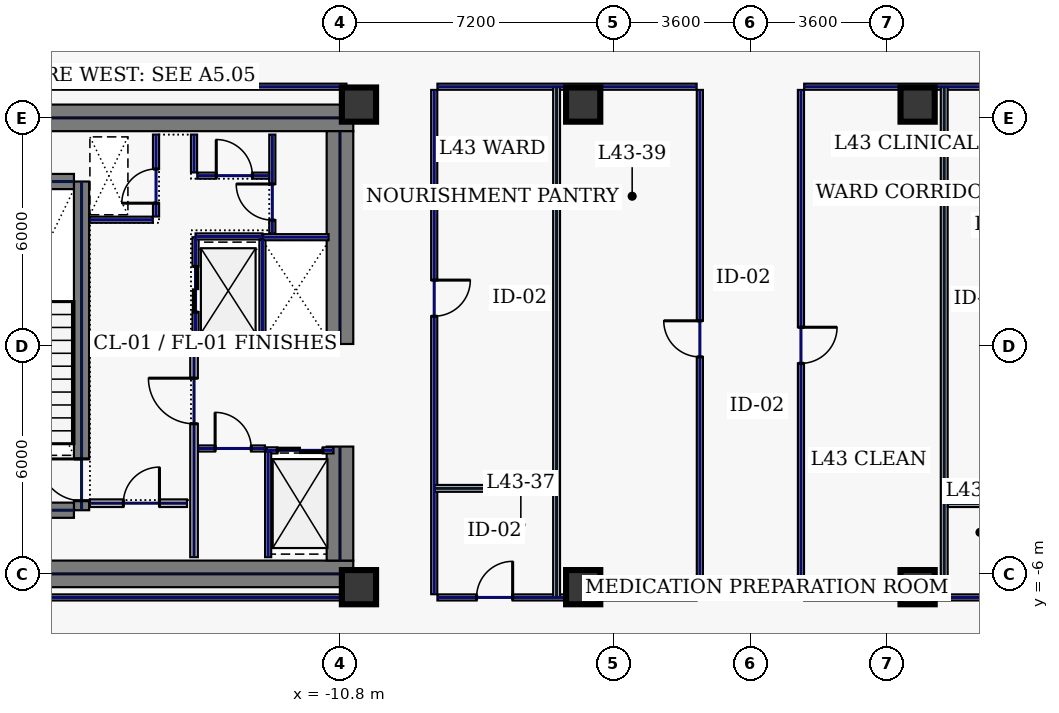
"""IFC4 building model, lengths in metres.
Left out: names, types, materials, properties, quantities, classifications, styles, units other than length and angle.
Written with IfcOpenShell. Run it as: python <this file> out.ifc"""

import sys

from ifc_helpers import new_model, si_unit, direction, frame, frame_2d, origin, origin_2d, place, context, subcontext, project, spatial, rectangle, hollow_rectangle, extrude, element, fill, save


model = new_model("IFC4")
c1 = context("Model", 3, precision=1e-05, world=origin(), true_north=direction((0.0, 1.0)))
c2 = subcontext(c1, "Body", "Model", "MODEL_VIEW")
j1 = project(units=[si_unit("LENGTHUNIT", "METRE"), si_unit("PLANEANGLEUNIT", "RADIAN")], contexts=[c1])
p1 = place(None, origin())
s1 = spatial("IfcSite", under=j1, at=p1, CompositionType="ELEMENT")
p2 = place(p1, origin())
s2 = spatial("IfcBuilding", under=s1, at=p2, CompositionType="ELEMENT")
p3 = place(p2, frame((0.0, 0.0, 188.2)))
s3 = spatial("IfcBuildingStorey", under=s2, at=p3, CompositionType="ELEMENT", Elevation=188.2)
for number, where, z_axis, x_axis in (
    (1, (-22.0, 6.0, 0.0), (0.0, 0.0, 1.0), (1.0, 0.0, 0.0)),
    (2, (-22.0, -6.0, 0.0), (0.0, 0.0, 1.0), (1.0, 0.0, 0.0)),
):
    element("IfcWall", number, at=place(p3, frame(where, z_axis=z_axis, x_axis=x_axis)), inside=s3, PredefinedType="SHEAR", context=c2, shape_type="SweptSolid", body=[
        extrude(rectangle(XDim=11.55, YDim=0.7, at=frame_2d((5.775, 0.0))), origin(), (0.0, 0.0, 1.0), 3.74),
    ])
p4 = place(p3, frame((-10.8, -5.65, 0.0), z_axis=(0.0, 0.0, 1.0), x_axis=(0.0, 1.0, 0.0)))
e3 = element("IfcWall", 3, at=p4, inside=s3, PredefinedType="SHEAR", context=c2, shape_type="SweptSolid", body=[
    extrude(rectangle(XDim=3.0, YDim=0.7, at=frame_2d((1.5, 0.0))), origin(), (0.0, 0.0, 1.0), 3.74),
])
p5 = place(p3, frame((-10.8, 0.05, 0.0), z_axis=(0.0, 0.0, 1.0), x_axis=(0.0, 1.0, 0.0)))
e4 = element("IfcWall", 4, at=p5, inside=s3, PredefinedType="SHEAR", context=c2, shape_type="SweptSolid", body=[
    extrude(rectangle(XDim=5.6, YDim=0.7, at=frame_2d((2.8, 0.0))), origin(), (0.0, 0.0, 1.0), 3.74),
])
p6 = place(p3, frame((-17.6, -4.325, 0.0), z_axis=(0.0, 0.0, 1.0), x_axis=(0.0, 1.0, 0.0)))
e5 = element("IfcWall", 5, at=p6, inside=s3, PredefinedType="SHEAR", context=c2, shape_type="SweptSolid", body=[
    extrude(rectangle(XDim=8.65, YDim=0.4, at=frame_2d((4.325, 0.0))), origin(), (0.0, 0.0, 1.0), 3.74),
])
p7 = place(p6, frame((0.25, 0.0, 0.0)))
e6 = element("IfcOpeningElement", 6, at=p7, cuts=e5, PredefinedType="OPENING", context=c2, shape_type="SweptSolid", body=[
    extrude(rectangle(XDim=1.1, YDim=2.2, at=frame_2d((0.55, 1.1))), frame((0.0, 0.21, 0.0), z_axis=(0.0, -1.0, 0.0), x_axis=(1.0, 0.0, 0.0)), (0.0, 0.0, 1.0), 0.42),
])
for number, where, z_axis, x_axis in (
    (7, (-21.2, -4.325, 0.0), (0.0, 0.0, 1.0), (1.0, 0.0, 0.0)),
    (8, (-21.2, 4.325, 0.0), (0.0, 0.0, 1.0), (1.0, 0.0, 0.0)),
):
    element("IfcWall", number, at=place(p3, frame(where, z_axis=z_axis, x_axis=x_axis)), inside=s3, PredefinedType="SHEAR", context=c2, shape_type="SweptSolid", body=[
        extrude(rectangle(XDim=3.4, YDim=0.4, at=frame_2d((1.7, 0.0))), origin(), (0.0, 0.0, 1.0), 3.74),
    ])
for number, where, z_axis, x_axis in (
    (9, (-10.3, -6.35, 0.0), (0.0, 0.0, 1.0), (1.0, 0.0, 0.0)),
    (10, (-10.3, 6.35, 0.0), (0.0, 0.0, 1.0), (1.0, 0.0, 0.0)),
    (11, (-4.4, -6.35, 0.0), (0.0, 0.0, 1.0), (1.0, 0.0, 0.0)),
    (12, (4.4, -6.35, 0.0), (0.0, 0.0, 1.0), (1.0, 0.0, 0.0)),
    (13, (-4.4, 6.35, 0.0), (0.0, 0.0, 1.0), (1.0, 0.0, 0.0)),
    (14, (4.4, 6.35, 0.0), (0.0, 0.0, 1.0), (1.0, 0.0, 0.0)),
):
    element("IfcColumn", number, at=place(p3, frame(where, z_axis=z_axis, x_axis=x_axis)), inside=s3, PredefinedType="COLUMN", context=c2, shape_type="SweptSolid", body=[
        extrude(hollow_rectangle(XDim=0.9, YDim=0.9, WallThickness=0.04, at=origin_2d()), origin(), (0.0, 0.0, 1.0), 3.74),
    ])
p8 = place(p3, frame((-14.6, 0.12, 0.0), z_axis=(0.0, 0.0, 1.0), x_axis=(0.0, 1.0, 0.0)))
e15 = element("IfcWall", 15, at=p8, inside=s3, PredefinedType="PARTITIONING", context=c2, shape_type="SweptSolid", body=[
    extrude(rectangle(XDim=2.74, YDim=0.16, at=frame_2d((1.37, 0.0))), origin(), (0.0, 0.0, 1.0), 3.74),
])
p9 = place(p8, frame((0.77, 0.0, 0.0)))
e16 = element("IfcOpeningElement", 16, at=p9, cuts=e15, PredefinedType="OPENING", context=c2, shape_type="SweptSolid", body=[
    extrude(rectangle(XDim=1.2, YDim=2.2, at=frame_2d((0.6, 1.1))), frame((0.0, 0.09, 0.0), z_axis=(0.0, -1.0, 0.0), x_axis=(1.0, 0.0, 0.0)), (0.0, 0.0, 1.0), 0.18),
])
for number, where, z_axis, x_axis in (
    (17, (-14.6, 0.1, 0.0), (0.0, 0.0, 1.0), (1.0, 0.0, 0.0)),
    (18, (-14.6, 2.88, 0.0), (0.0, 0.0, 1.0), (1.0, 0.0, 0.0)),
):
    element("IfcWall", number, at=place(p3, frame(where, z_axis=z_axis, x_axis=x_axis)), inside=s3, PredefinedType="PARTITIONING", context=c2, shape_type="SweptSolid", body=[
        extrude(rectangle(XDim=1.76, YDim=0.16, at=frame_2d((0.88, 0.0))), origin(), (0.0, 0.0, 1.0), 3.74),
    ])
p10 = place(p3, frame((-12.84, 0.18, 0.0), z_axis=(0.0, 0.0, 1.0), x_axis=(0.0, 1.0, 0.0)))
e19 = element("IfcWall", 19, at=p10, inside=s3, PredefinedType="PARTITIONING", context=c2, shape_type="SweptSolid", body=[
    extrude(rectangle(XDim=2.62, YDim=0.16, at=frame_2d((1.31, 0.0))), origin(), (0.0, 0.0, 1.0), 3.74),
])
p11 = place(p3, frame((-12.73, -2.75, 0.0), z_axis=(0.0, 0.0, 1.0), x_axis=(1.0, 0.0, 0.0)))
e20 = element("IfcWall", 20, at=p11, inside=s3, PredefinedType="PARTITIONING", context=c2, shape_type="SweptSolid", body=[
    extrude(rectangle(XDim=1.76, YDim=0.16, at=frame_2d((0.88, 0.0))), origin(), (0.0, 0.0, 1.0), 3.74),
])
p12 = place(p11, frame((0.28, 0.0, 0.0)))
e21 = element("IfcOpeningElement", 21, at=p12, cuts=e20, PredefinedType="OPENING", context=c2, shape_type="SweptSolid", body=[
    extrude(rectangle(XDim=1.2, YDim=2.2, at=frame_2d((0.6, 1.1))), frame((0.0, 0.09, 0.0), z_axis=(0.0, -1.0, 0.0), x_axis=(1.0, 0.0, 0.0)), (0.0, 0.0, 1.0), 0.18),
])
for number, where, z_axis, x_axis in (
    (22, (-12.82, 0.06, 0.0), (0.0, 0.0, 1.0), (1.0, 0.0, 0.0)),
    (23, (-12.82, 2.86, 0.0), (0.0, 0.0, 1.0), (1.0, 0.0, 0.0)),
):
    element("IfcWall", number, at=place(p3, frame(where, z_axis=z_axis, x_axis=x_axis)), inside=s3, PredefinedType="PARTITIONING", context=c2, shape_type="SweptSolid", body=[
        extrude(rectangle(XDim=1.72, YDim=0.16, at=frame_2d((0.86, 0.0))), origin(), (0.0, 0.0, 1.0), 3.74),
    ])
p13 = place(p3, frame((-15.64, 3.405, 0.0), z_axis=(0.0, 0.0, 1.0), x_axis=(0.0, 1.0, 0.0)))
e24 = element("IfcWall", 24, at=p13, inside=s3, PredefinedType="PARTITIONING", context=c2, shape_type="SweptSolid", body=[
    extrude(rectangle(XDim=2.155, YDim=0.16, at=frame_2d((1.078, 0.0))), origin(), (0.0, 0.0, 1.0), 3.74),
])
p14 = place(p13, frame((0.35, 0.0, 0.0)))
e25 = element("IfcOpeningElement", 25, at=p14, cuts=e24, PredefinedType="OPENING", context=c2, shape_type="SweptSolid", body=[
    extrude(rectangle(XDim=0.9, YDim=2.2, at=frame_2d((0.45, 1.1))), frame((0.0, 0.09, 0.0), z_axis=(0.0, -1.0, 0.0), x_axis=(1.0, 0.0, 0.0)), (0.0, 0.0, 1.0), 0.18),
])
p15 = place(p3, frame((-17.38, 3.32, 0.0), z_axis=(0.0, 0.0, 1.0), x_axis=(1.0, 0.0, 0.0)))
e26 = element("IfcWall", 26, at=p15, inside=s3, PredefinedType="PARTITIONING", context=c2, shape_type="SweptSolid", body=[
    extrude(rectangle(XDim=1.655, YDim=0.16, at=frame_2d((0.827, 0.0))), origin(), (0.0, 0.0, 1.0), 3.74),
])
p16 = place(p3, frame((-17.38, -4.14, 0.0), z_axis=(0.0, 0.0, 1.0), x_axis=(1.0, 0.0, 0.0)))
e27 = element("IfcWall", 27, at=p16, inside=s3, PredefinedType="SOLIDWALL", context=c2, shape_type="SweptSolid", body=[
    extrude(rectangle(XDim=2.555, YDim=0.2, at=frame_2d((1.277, 0.0))), origin(), (0.0, 0.0, 1.0), 3.74),
])
p17 = place(p16, frame((0.88, 0.0, 0.0)))
e28 = element("IfcOpeningElement", 28, at=p17, cuts=e27, PredefinedType="OPENING", context=c2, shape_type="SweptSolid", body=[
    extrude(rectangle(XDim=0.95, YDim=2.2, at=frame_2d((0.475, 1.1))), frame((0.0, 0.11, 0.0), z_axis=(0.0, -1.0, 0.0), x_axis=(1.0, 0.0, 0.0)), (0.0, 0.0, 1.0), 0.22),
])
p18 = place(p3, frame((-14.535, -2.7, 0.0), z_axis=(0.0, 0.0, 1.0), x_axis=(1.0, 0.0, 0.0)))
e29 = element("IfcWall", 29, at=p18, inside=s3, PredefinedType="PARTITIONING", context=c2, shape_type="SweptSolid", body=[
    extrude(rectangle(XDim=1.76, YDim=0.16, at=frame_2d((0.88, 0.0))), origin(), (0.0, 0.0, 1.0), 3.74),
])
p19 = place(p18, frame((0.45, 0.0, 0.0)))
e30 = element("IfcOpeningElement", 30, at=p19, cuts=e29, PredefinedType="OPENING", context=c2, shape_type="SweptSolid", body=[
    extrude(rectangle(XDim=0.95, YDim=2.2, at=frame_2d((0.475, 1.1))), frame((0.0, 0.09, 0.0), z_axis=(0.0, -1.0, 0.0), x_axis=(1.0, 0.0, 0.0)), (0.0, 0.0, 1.0), 0.18),
])
p20 = place(p3, frame((-12.69, -5.56, 0.0), z_axis=(0.0, 0.0, 1.0), x_axis=(0.0, 1.0, 0.0)))
e31 = element("IfcWall", 31, at=p20, inside=s3, PredefinedType="PARTITIONING", context=c2, shape_type="SweptSolid", body=[
    extrude(rectangle(XDim=2.775, YDim=0.16, at=frame_2d((1.388, 0.0))), origin(), (0.0, 0.0, 1.0), 3.74),
])
p21 = place(p3, frame((-12.58, 2.96, 0.0), z_axis=(0.0, 0.0, 1.0), x_axis=(0.0, 1.0, 0.0)))
e32 = element("IfcWall", 32, at=p21, inside=s3, PredefinedType="PARTITIONING", context=c2, shape_type="SweptSolid", body=[
    extrude(rectangle(XDim=2.6, YDim=0.16, at=frame_2d((1.3, 0.0))), origin(), (0.0, 0.0, 1.0), 3.74),
])
p22 = place(p21, frame((0.35, 0.0, 0.0)))
e33 = element("IfcOpeningElement", 33, at=p22, cuts=e32, PredefinedType="OPENING", context=c2, shape_type="SweptSolid", body=[
    extrude(rectangle(XDim=0.95, YDim=2.2, at=frame_2d((0.475, 1.1))), frame((0.0, 0.09, 0.0), z_axis=(0.0, -1.0, 0.0), x_axis=(1.0, 0.0, 0.0)), (0.0, 0.0, 1.0), 0.18),
])
p23 = place(p3, frame((-14.555, 4.48, 0.0), z_axis=(0.0, 0.0, 1.0), x_axis=(1.0, 0.0, 0.0)))
e34 = element("IfcWall", 34, at=p23, inside=s3, PredefinedType="PARTITIONING", context=c2, shape_type="SweptSolid", body=[
    extrude(rectangle(XDim=1.89, YDim=0.16, at=frame_2d((0.945, 0.0))), origin(), (0.0, 0.0, 1.0), 3.74),
])
p24 = place(p23, frame((0.5, 0.0, 0.0)))
e35 = element("IfcOpeningElement", 35, at=p24, cuts=e34, PredefinedType="OPENING", context=c2, shape_type="SweptSolid", body=[
    extrude(rectangle(XDim=0.95, YDim=2.2, at=frame_2d((0.475, 1.1))), frame((0.0, 0.09, 0.0), z_axis=(0.0, -1.0, 0.0), x_axis=(1.0, 0.0, 0.0)), (0.0, 0.0, 1.0), 0.18),
])
p25 = place(p3, frame((-14.64, 4.565, 0.0), z_axis=(0.0, 0.0, 1.0), x_axis=(0.0, 1.0, 0.0)))
e36 = element("IfcWall", 36, at=p25, inside=s3, PredefinedType="PARTITIONING", context=c2, shape_type="SweptSolid", body=[
    extrude(rectangle(XDim=0.995, YDim=0.16, at=frame_2d((0.498, 0.0))), origin(), (0.0, 0.0, 1.0), 3.74),
])
p26 = place(p3, frame((-14.64, -5.56, 0.0), z_axis=(0.0, 0.0, 1.0), x_axis=(0.0, 1.0, 0.0)))
e37 = element("IfcWall", 37, at=p26, inside=s3, PredefinedType="SOLIDWALL", context=c2, shape_type="SweptSolid", body=[
    extrude(rectangle(XDim=5.6, YDim=0.2, at=frame_2d((2.8, 0.0))), origin(), (0.0, 0.0, 1.0), 3.74),
])
p27 = place(p26, frame((3.51, 0.0, 0.0)))
e38 = element("IfcOpeningElement", 38, at=p27, cuts=e37, PredefinedType="OPENING", context=c2, shape_type="SweptSolid", body=[
    extrude(rectangle(XDim=1.2, YDim=2.2, at=frame_2d((0.6, 1.1))), frame((0.0, 0.11, 0.0), z_axis=(0.0, -1.0, 0.0), x_axis=(1.0, 0.0, 0.0)), (0.0, 0.0, 1.0), 0.22),
])
for number, where, z_axis, x_axis in (
    (39, (-24.965, -6.62, 0.0), (0.0, 0.0, 1.0), (1.0, 0.0, 0.0)),
    (40, (-10.63, 6.82, 0.0), (0.0, 0.0, 1.0), (-1.0, 0.0, 0.0)),
):
    element("IfcWall", number, at=place(p3, frame(where, z_axis=z_axis, x_axis=x_axis)), inside=s3, PredefinedType="PARTITIONING", context=c2, shape_type="SweptSolid", body=[
        extrude(rectangle(XDim=14.335, YDim=0.16, at=frame_2d((7.167, 0.0))), origin(), (0.0, 0.0, 1.0), 3.74),
    ])
p28 = place(p3, frame((8.235, 6.82, 0.0), z_axis=(0.0, 0.0, 1.0), x_axis=(-1.0, 0.0, 0.0)))
e41 = element("IfcWall", 41, at=p28, inside=s3, PredefinedType="PARTITIONING", context=c2, shape_type="SweptSolid", body=[
    extrude(rectangle(XDim=6.82, YDim=0.16, at=frame_2d((3.41, 0.0))), origin(), (0.0, 0.0, 1.0), 3.74),
])
p29 = place(p3, frame((1.33, 6.735, 0.0), z_axis=(0.0, 0.0, 1.0), x_axis=(0.0, -1.0, 0.0)))
e42 = element("IfcWall", 42, at=p29, inside=s3, PredefinedType="PARTITIONING", context=c2, shape_type="SweptSolid", body=[
    extrude(rectangle(XDim=13.27, YDim=0.16, at=frame_2d((6.635, 0.0))), origin(), (0.0, 0.0, 1.0), 3.74),
])
p30 = place(p29, frame((6.245, 0.0, 0.0)))
e43 = element("IfcOpeningElement", 43, at=p30, cuts=e42, PredefinedType="OPENING", context=c2, shape_type="SweptSolid", body=[
    extrude(rectangle(XDim=0.95, YDim=2.2, at=frame_2d((0.475, 1.1))), frame((0.0, 0.09, 0.0), z_axis=(0.0, -1.0, 0.0), x_axis=(1.0, 0.0, 0.0)), (0.0, 0.0, 1.0), 0.18),
])
p31 = place(p3, frame((1.415, -6.62, 0.0), z_axis=(0.0, 0.0, 1.0), x_axis=(1.0, 0.0, 0.0)))
e44 = element("IfcWall", 44, at=p31, inside=s3, PredefinedType="PARTITIONING", context=c2, shape_type="SweptSolid", body=[
    extrude(rectangle(XDim=6.82, YDim=0.16, at=frame_2d((3.41, 0.0))), origin(), (0.0, 0.0, 1.0), 3.74),
])
p32 = place(p31, frame((5.011, 0.0, 0.0)))
e45 = element("IfcOpeningElement", 45, at=p32, cuts=e44, PredefinedType="OPENING", context=c2, shape_type="SweptSolid", body=[
    extrude(rectangle(XDim=0.95, YDim=2.2, at=frame_2d((0.475, 1.1))), frame((0.0, 0.09, 0.0), z_axis=(0.0, -1.0, 0.0), x_axis=(1.0, 0.0, 0.0)), (0.0, 0.0, 1.0), 0.18),
])
p33 = place(p3, frame((-1.33, -6.535, 0.0), z_axis=(0.0, 0.0, 1.0), x_axis=(0.0, 1.0, 0.0)))
e46 = element("IfcWall", 46, at=p33, inside=s3, PredefinedType="PARTITIONING", context=c2, shape_type="SweptSolid", body=[
    extrude(rectangle(XDim=13.27, YDim=0.16, at=frame_2d((6.635, 0.0))), origin(), (0.0, 0.0, 1.0), 3.74),
])
p34 = place(p33, frame((6.245, 0.0, 0.0)))
e47 = element("IfcOpeningElement", 47, at=p34, cuts=e46, PredefinedType="OPENING", context=c2, shape_type="SweptSolid", body=[
    extrude(rectangle(XDim=0.95, YDim=2.2, at=frame_2d((0.475, 1.1))), frame((0.0, 0.09, 0.0), z_axis=(0.0, -1.0, 0.0), x_axis=(1.0, 0.0, 0.0)), (0.0, 0.0, 1.0), 0.18),
])
p35 = place(p3, frame((-1.415, 6.82, 0.0), z_axis=(0.0, 0.0, 1.0), x_axis=(-1.0, 0.0, 0.0)))
e48 = element("IfcWall", 48, at=p35, inside=s3, PredefinedType="PARTITIONING", context=c2, shape_type="SweptSolid", body=[
    extrude(rectangle(XDim=6.82, YDim=0.16, at=frame_2d((3.41, 0.0))), origin(), (0.0, 0.0, 1.0), 3.74),
])
p36 = place(p3, frame((-8.32, 6.735, 0.0), z_axis=(0.0, 0.0, 1.0), x_axis=(0.0, -1.0, 0.0)))
e49 = element("IfcWall", 49, at=p36, inside=s3, PredefinedType="PARTITIONING", context=c2, shape_type="SweptSolid", body=[
    extrude(rectangle(XDim=13.27, YDim=0.16, at=frame_2d((6.635, 0.0))), origin(), (0.0, 0.0, 1.0), 3.74),
])
p37 = place(p36, frame((5.004, 0.0, 0.0)))
e50 = element("IfcOpeningElement", 50, at=p37, cuts=e49, PredefinedType="OPENING", context=c2, shape_type="SweptSolid", body=[
    extrude(rectangle(XDim=0.95, YDim=2.2, at=frame_2d((0.475, 1.1))), frame((0.0, 0.09, 0.0), z_axis=(0.0, -1.0, 0.0), x_axis=(1.0, 0.0, 0.0)), (0.0, 0.0, 1.0), 0.18),
])
p38 = place(p3, frame((-8.235, -6.62, 0.0), z_axis=(0.0, 0.0, 1.0), x_axis=(1.0, 0.0, 0.0)))
e51 = element("IfcWall", 51, at=p38, inside=s3, PredefinedType="PARTITIONING", context=c2, shape_type="SweptSolid", body=[
    extrude(rectangle(XDim=6.82, YDim=0.16, at=frame_2d((3.41, 0.0))), origin(), (0.0, 0.0, 1.0), 3.74),
])
p39 = place(p38, frame((1.029, 0.0, 0.0)))
e52 = element("IfcOpeningElement", 52, at=p39, cuts=e51, PredefinedType="OPENING", context=c2, shape_type="SweptSolid", body=[
    extrude(rectangle(XDim=0.95, YDim=2.2, at=frame_2d((0.475, 1.1))), frame((0.0, 0.09, 0.0), z_axis=(0.0, -1.0, 0.0), x_axis=(1.0, 0.0, 0.0)), (0.0, 0.0, 1.0), 0.18),
])
for number, where, z_axis, x_axis in (
    (53, (-5.1, -6.615, 0.0), (0.0, 0.0, 1.0), (0.0, 1.0, 0.0)),
    (54, (5.1, -6.615, 0.0), (0.0, 0.0, 1.0), (0.0, 1.0, 0.0)),
):
    element("IfcWall", number, at=place(p3, frame(where, z_axis=z_axis, x_axis=x_axis)), inside=s3, PredefinedType="PARTITIONING", context=c2, shape_type="SweptSolid", body=[
        extrude(rectangle(XDim=13.43, YDim=0.18, at=frame_2d((6.715, 0.0))), origin(), (0.0, 0.0, 1.0), 3.74),
    ])
for number, where, z_axis, x_axis in (
    (55, (-8.315, -3.75, 0.0), (0.0, 0.0, 1.0), (1.0, 0.0, 0.0)),
    (56, (5.195, -4.15, 0.0), (0.0, 0.0, 1.0), (1.0, 0.0, 0.0)),
):
    element("IfcWall", number, at=place(p3, frame(where, z_axis=z_axis, x_axis=x_axis)), inside=s3, PredefinedType="PARTITIONING", context=c2, shape_type="SweptSolid", body=[
        extrude(rectangle(XDim=3.12, YDim=0.18, at=frame_2d((1.56, 0.0))), origin(), (0.0, 0.0, 1.0), 3.74),
    ])
p40 = place(p7, origin())
e57 = element("IfcDoor", 57, at=p40, inside=s3, OperationType="SINGLE_SWING_RIGHT", PredefinedType="DOOR", context=c2, shape_type="SweptSolid", body=[
    extrude(rectangle(XDim=1.1, YDim=2.2, at=frame_2d((0.55, 1.1))), frame((0.0, 0.025, 0.0), z_axis=(0.0, -1.0, 0.0), x_axis=(1.0, 0.0, 0.0)), (0.0, 0.0, 1.0), 0.05),
])
fill(e6, e57)
p41 = place(p9, origin())
e58 = element("IfcDoor", 58, at=p41, inside=s3, OperationType="SLIDING_TO_LEFT", PredefinedType="DOOR", context=c2, shape_type="SweptSolid", body=[
    extrude(rectangle(XDim=1.2, YDim=2.2, at=frame_2d((0.6, 1.1))), frame((0.0, 0.025, 0.0), z_axis=(0.0, -1.0, 0.0), x_axis=(1.0, 0.0, 0.0)), (0.0, 0.0, 1.0), 0.05),
])
fill(e16, e58)
p42 = place(p12, origin())
e59 = element("IfcDoor", 59, at=p42, inside=s3, OperationType="SLIDING_TO_LEFT", PredefinedType="DOOR", context=c2, shape_type="SweptSolid", body=[
    extrude(rectangle(XDim=1.2, YDim=2.2, at=frame_2d((0.6, 1.1))), frame((0.0, 0.025, 0.0), z_axis=(0.0, -1.0, 0.0), x_axis=(1.0, 0.0, 0.0)), (0.0, 0.0, 1.0), 0.05),
])
fill(e21, e59)
p43 = place(p14, origin())
e60 = element("IfcDoor", 60, at=p43, inside=s3, OperationType="SINGLE_SWING_LEFT", PredefinedType="DOOR", context=c2, shape_type="SweptSolid", body=[
    extrude(rectangle(XDim=0.9, YDim=2.2, at=frame_2d((0.45, 1.1))), frame((0.0, 0.025, 0.0), z_axis=(0.0, -1.0, 0.0), x_axis=(1.0, 0.0, 0.0)), (0.0, 0.0, 1.0), 0.05),
])
fill(e25, e60)
p44 = place(p17, origin())
e61 = element("IfcDoor", 61, at=p44, inside=s3, OperationType="SINGLE_SWING_RIGHT", PredefinedType="DOOR", context=c2, shape_type="SweptSolid", body=[
    extrude(rectangle(XDim=0.95, YDim=2.2, at=frame_2d((0.475, 1.1))), frame((0.0, 0.025, 0.0), z_axis=(0.0, -1.0, 0.0), x_axis=(1.0, 0.0, 0.0)), (0.0, 0.0, 1.0), 0.05),
])
fill(e28, e61)
p45 = place(p19, origin())
e62 = element("IfcDoor", 62, at=p45, inside=s3, OperationType="SINGLE_SWING_LEFT", PredefinedType="DOOR", context=c2, shape_type="SweptSolid", body=[
    extrude(rectangle(XDim=0.95, YDim=2.2, at=frame_2d((0.475, 1.1))), frame((0.0, 0.025, 0.0), z_axis=(0.0, -1.0, 0.0), x_axis=(1.0, 0.0, 0.0)), (0.0, 0.0, 1.0), 0.05),
])
fill(e30, e62)
p46 = place(p22, origin())
e63 = element("IfcDoor", 63, at=p46, inside=s3, OperationType="SINGLE_SWING_RIGHT", PredefinedType="DOOR", context=c2, shape_type="SweptSolid", body=[
    extrude(rectangle(XDim=0.95, YDim=2.2, at=frame_2d((0.475, 1.1))), frame((0.0, 0.025, 0.0), z_axis=(0.0, -1.0, 0.0), x_axis=(1.0, 0.0, 0.0)), (0.0, 0.0, 1.0), 0.05),
])
fill(e33, e63)
p47 = place(p24, origin())
e64 = element("IfcDoor", 64, at=p47, inside=s3, OperationType="SINGLE_SWING_LEFT", PredefinedType="DOOR", context=c2, shape_type="SweptSolid", body=[
    extrude(rectangle(XDim=0.95, YDim=2.2, at=frame_2d((0.475, 1.1))), frame((0.0, 0.025, 0.0), z_axis=(0.0, -1.0, 0.0), x_axis=(1.0, 0.0, 0.0)), (0.0, 0.0, 1.0), 0.05),
])
fill(e35, e64)
p48 = place(p27, origin())
e65 = element("IfcDoor", 65, at=p48, inside=s3, OperationType="SINGLE_SWING_RIGHT", PredefinedType="DOOR", context=c2, shape_type="SweptSolid", body=[
    extrude(rectangle(XDim=1.2, YDim=2.2, at=frame_2d((0.6, 1.1))), frame((0.0, 0.025, 0.0), z_axis=(0.0, -1.0, 0.0), x_axis=(1.0, 0.0, 0.0)), (0.0, 0.0, 1.0), 0.05),
])
fill(e38, e65)
p49 = place(p39, origin())
e66 = element("IfcDoor", 66, at=p49, inside=s3, OperationType="SINGLE_SWING_RIGHT", PredefinedType="DOOR", context=c2, shape_type="SweptSolid", body=[
    extrude(rectangle(XDim=0.95, YDim=2.2, at=frame_2d((0.475, 1.1))), frame((0.0, 0.025, 0.0), z_axis=(0.0, -1.0, 0.0), x_axis=(1.0, 0.0, 0.0)), (0.0, 0.0, 1.0), 0.05),
])
fill(e52, e66)
p50 = place(p37, origin())
e67 = element("IfcDoor", 67, at=p50, inside=s3, OperationType="SINGLE_SWING_LEFT", PredefinedType="DOOR", context=c2, shape_type="SweptSolid", body=[
    extrude(rectangle(XDim=0.95, YDim=2.2, at=frame_2d((0.475, 1.1))), frame((0.0, 0.025, 0.0), z_axis=(0.0, -1.0, 0.0), x_axis=(1.0, 0.0, 0.0)), (0.0, 0.0, 1.0), 0.05),
])
fill(e50, e67)
p51 = place(p34, origin())
e68 = element("IfcDoor", 68, at=p51, inside=s3, OperationType="SINGLE_SWING_RIGHT", PredefinedType="DOOR", context=c2, shape_type="SweptSolid", body=[
    extrude(rectangle(XDim=0.95, YDim=2.2, at=frame_2d((0.475, 1.1))), frame((0.0, 0.025, 0.0), z_axis=(0.0, -1.0, 0.0), x_axis=(1.0, 0.0, 0.0)), (0.0, 0.0, 1.0), 0.05),
])
fill(e47, e68)
p52 = place(p30, origin())
e69 = element("IfcDoor", 69, at=p52, inside=s3, OperationType="SINGLE_SWING_LEFT", PredefinedType="DOOR", context=c2, shape_type="SweptSolid", body=[
    extrude(rectangle(XDim=0.95, YDim=2.2, at=frame_2d((0.475, 1.1))), frame((0.0, 0.025, 0.0), z_axis=(0.0, -1.0, 0.0), x_axis=(1.0, 0.0, 0.0)), (0.0, 0.0, 1.0), 0.05),
])
fill(e43, e69)
save(model, sys.argv[1])
